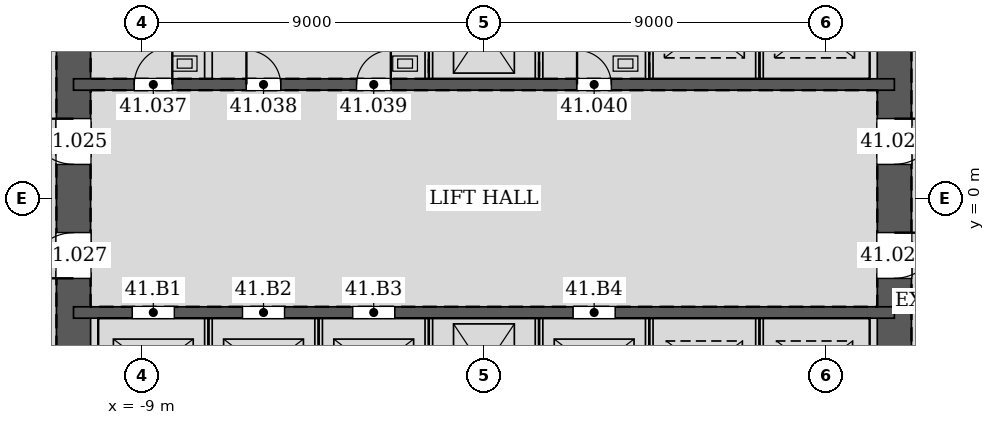
"""IFC4 building model, lengths in metres.
Left out: names, types, materials, properties, quantities, classifications, styles, units other than length and angle.
Written with IfcOpenShell. Run it as: python <this file> out.ifc"""

import sys

from ifc_helpers import new_model, si_unit, direction, frame, frame_2d, origin, place, context, subcontext, project, spatial, rectangle, extrude, element, fill, save


model = new_model("IFC4")
c1 = context("Model", 3, precision=1e-05, world=origin(), true_north=direction((0.0, 1.0)))
c2 = subcontext(c1, "Body", "Model", "MODEL_VIEW")
j1 = project(units=[si_unit("LENGTHUNIT", "METRE"), si_unit("PLANEANGLEUNIT", "RADIAN")], contexts=[c1])
p1 = place(None, origin())
s1 = spatial("IfcSite", under=j1, at=p1, CompositionType="ELEMENT")
p2 = place(p1, origin())
s2 = spatial("IfcBuilding", under=s1, at=p2, CompositionType="ELEMENT")
p3 = place(p2, frame((0.0, 0.0, 180.6)))
s3 = spatial("IfcBuildingStorey", under=s2, at=p3, CompositionType="ELEMENT", Elevation=180.6)
p4 = place(p3, frame((10.8, -10.8, 0.0), z_axis=(0.0, 0.0, 1.0), x_axis=(0.0, 1.0, 0.0)))
e1 = element("IfcWall", 1, at=p4, inside=s3, PredefinedType="SOLIDWALL", context=c2, shape_type="SweptSolid", body=[
    extrude(rectangle(XDim=21.6, YDim=0.9, at=frame_2d((10.8, 0.0))), origin(), (0.0, 0.0, 1.0), 4.2),
])
p5 = place(p4, frame((11.7, 0.0, 0.0)))
e2 = element("IfcOpeningElement", 2, at=p5, cuts=e1, PredefinedType="OPENING", context=c2, shape_type="SweptSolid", body=[
    extrude(rectangle(XDim=1.2, YDim=2.1, at=frame_2d((0.6, 1.05))), frame((0.0, 0.46, 0.0), z_axis=(0.0, -1.0, 0.0), x_axis=(1.0, 0.0, 0.0)), (0.0, 0.0, 1.0), 0.92),
])
p6 = place(p4, frame((8.7, 0.0, 0.0)))
e3 = element("IfcOpeningElement", 3, at=p6, cuts=e1, PredefinedType="OPENING", context=c2, shape_type="SweptSolid", body=[
    extrude(rectangle(XDim=1.2, YDim=2.1, at=frame_2d((0.6, 1.05))), frame((0.0, 0.46, 0.0), z_axis=(0.0, -1.0, 0.0), x_axis=(1.0, 0.0, 0.0)), (0.0, 0.0, 1.0), 0.92),
])
p7 = place(p3, frame((-10.8, 10.8, 0.0), z_axis=(0.0, 0.0, 1.0), x_axis=(0.0, -1.0, 0.0)))
e4 = element("IfcWall", 4, at=p7, inside=s3, PredefinedType="SOLIDWALL", context=c2, shape_type="SweptSolid", body=[
    extrude(rectangle(XDim=21.6, YDim=0.9, at=frame_2d((10.8, 0.0))), origin(), (0.0, 0.0, 1.0), 4.2),
])
p8 = place(p7, frame((8.7, 0.0, 0.0)))
e5 = element("IfcOpeningElement", 5, at=p8, cuts=e4, PredefinedType="OPENING", context=c2, shape_type="SweptSolid", body=[
    extrude(rectangle(XDim=1.2, YDim=2.1, at=frame_2d((0.6, 1.05))), frame((0.0, 0.46, 0.0), z_axis=(0.0, -1.0, 0.0), x_axis=(1.0, 0.0, 0.0)), (0.0, 0.0, 1.0), 0.92),
])
p9 = place(p7, frame((11.7, 0.0, 0.0)))
e6 = element("IfcOpeningElement", 6, at=p9, cuts=e4, PredefinedType="OPENING", context=c2, shape_type="SweptSolid", body=[
    extrude(rectangle(XDim=1.2, YDim=2.1, at=frame_2d((0.6, 1.05))), frame((0.0, 0.46, 0.0), z_axis=(0.0, -1.0, 0.0), x_axis=(1.0, 0.0, 0.0)), (0.0, 0.0, 1.0), 0.92),
])
p10 = place(p3, frame((-10.8, 3.0, 0.0), z_axis=(0.0, 0.0, 1.0), x_axis=(1.0, 0.0, 0.0)))
e7 = element("IfcWall", 7, at=p10, inside=s3, PredefinedType="SOLIDWALL", context=c2, shape_type="SweptSolid", body=[
    extrude(rectangle(XDim=21.6, YDim=0.3, at=frame_2d((10.8, 0.0))), origin(), (0.0, 0.0, 1.0), 4.2),
])
p11 = place(p10, frame((1.6, 0.0, 0.0)))
e8 = element("IfcOpeningElement", 8, at=p11, cuts=e7, PredefinedType="OPENING", context=c2, shape_type="SweptSolid", body=[
    extrude(rectangle(XDim=1.0, YDim=2.1, at=frame_2d((0.5, 1.05))), frame((0.0, 0.16, 0.0), z_axis=(0.0, -1.0, 0.0), x_axis=(1.0, 0.0, 0.0)), (0.0, 0.0, 1.0), 0.32),
])
p12 = place(p10, frame((4.55, 0.0, 0.0)))
e9 = element("IfcOpeningElement", 9, at=p12, cuts=e7, PredefinedType="OPENING", context=c2, shape_type="SweptSolid", body=[
    extrude(rectangle(XDim=0.9, YDim=2.1, at=frame_2d((0.45, 1.05))), frame((0.0, 0.16, 0.0), z_axis=(0.0, -1.0, 0.0), x_axis=(1.0, 0.0, 0.0)), (0.0, 0.0, 1.0), 0.32),
])
p13 = place(p10, frame((7.45, 0.0, 0.0)))
e10 = element("IfcOpeningElement", 10, at=p13, cuts=e7, PredefinedType="OPENING", context=c2, shape_type="SweptSolid", body=[
    extrude(rectangle(XDim=0.9, YDim=2.1, at=frame_2d((0.45, 1.05))), frame((0.0, 0.16, 0.0), z_axis=(0.0, -1.0, 0.0), x_axis=(1.0, 0.0, 0.0)), (0.0, 0.0, 1.0), 0.32),
])
p14 = place(p10, frame((13.25, 0.0, 0.0)))
e11 = element("IfcOpeningElement", 11, at=p14, cuts=e7, PredefinedType="OPENING", context=c2, shape_type="SweptSolid", body=[
    extrude(rectangle(XDim=0.9, YDim=2.1, at=frame_2d((0.45, 1.05))), frame((0.0, 0.16, 0.0), z_axis=(0.0, -1.0, 0.0), x_axis=(1.0, 0.0, 0.0)), (0.0, 0.0, 1.0), 0.32),
])
p15 = place(p3, frame((-10.8, -3.0, 0.0), z_axis=(0.0, 0.0, 1.0), x_axis=(1.0, 0.0, 0.0)))
e12 = element("IfcWall", 12, at=p15, inside=s3, PredefinedType="SOLIDWALL", context=c2, shape_type="SweptSolid", body=[
    extrude(rectangle(XDim=21.6, YDim=0.3, at=frame_2d((10.8, 0.0))), origin(), (0.0, 0.0, 1.0), 4.2),
])
p16 = place(p15, frame((1.55, 0.0, 0.0)))
e13 = element("IfcOpeningElement", 13, at=p16, cuts=e12, PredefinedType="OPENING", context=c2, shape_type="SweptSolid", body=[
    extrude(rectangle(XDim=1.1, YDim=2.1, at=frame_2d((0.55, 1.05))), frame((0.0, 0.16, 0.0), z_axis=(0.0, -1.0, 0.0), x_axis=(1.0, 0.0, 0.0)), (0.0, 0.0, 1.0), 0.32),
])
p17 = place(p15, frame((4.45, 0.0, 0.0)))
e14 = element("IfcOpeningElement", 14, at=p17, cuts=e12, PredefinedType="OPENING", context=c2, shape_type="SweptSolid", body=[
    extrude(rectangle(XDim=1.1, YDim=2.1, at=frame_2d((0.55, 1.05))), frame((0.0, 0.16, 0.0), z_axis=(0.0, -1.0, 0.0), x_axis=(1.0, 0.0, 0.0)), (0.0, 0.0, 1.0), 0.32),
])
p18 = place(p15, frame((7.35, 0.0, 0.0)))
e15 = element("IfcOpeningElement", 15, at=p18, cuts=e12, PredefinedType="OPENING", context=c2, shape_type="SweptSolid", body=[
    extrude(rectangle(XDim=1.1, YDim=2.1, at=frame_2d((0.55, 1.05))), frame((0.0, 0.16, 0.0), z_axis=(0.0, -1.0, 0.0), x_axis=(1.0, 0.0, 0.0)), (0.0, 0.0, 1.0), 0.32),
])
p19 = place(p15, frame((13.15, 0.0, 0.0)))
e16 = element("IfcOpeningElement", 16, at=p19, cuts=e12, PredefinedType="OPENING", context=c2, shape_type="SweptSolid", body=[
    extrude(rectangle(XDim=1.1, YDim=2.1, at=frame_2d((0.55, 1.05))), frame((0.0, 0.16, 0.0), z_axis=(0.0, -1.0, 0.0), x_axis=(1.0, 0.0, 0.0)), (0.0, 0.0, 1.0), 0.32),
])
for number, where, z_axis, x_axis in (
    (17, (-7.25, 3.15, 0.0), (0.0, 0.0, 1.0), (0.0, 1.0, 0.0)),
    (18, (-1.45, 3.15, 0.0), (0.0, 0.0, 1.0), (0.0, 1.0, 0.0)),
    (19, (1.45, 3.15, 0.0), (0.0, 0.0, 1.0), (0.0, 1.0, 0.0)),
    (20, (4.35, 3.15, 0.0), (0.0, 0.0, 1.0), (0.0, 1.0, 0.0)),
):
    element("IfcWall", number, at=place(p3, frame(where, z_axis=z_axis, x_axis=x_axis)), inside=s3, PredefinedType="PARTITIONING", context=c2, shape_type="SweptSolid", body=[
        extrude(rectangle(XDim=2.7, YDim=0.2, at=frame_2d((1.35, 0.0))), origin(), (0.0, 0.0, 1.0), 4.035),
    ])
for number, where, z_axis, x_axis in (
    (21, (7.25, 3.15, 0.0), (0.0, 0.0, 1.0), (0.0, 1.0, 0.0)),
    (22, (-7.25, -5.85, 0.0), (0.0, 0.0, 1.0), (0.0, 1.0, 0.0)),
    (23, (-4.35, -5.85, 0.0), (0.0, 0.0, 1.0), (0.0, 1.0, 0.0)),
    (24, (-1.45, -5.85, 0.0), (0.0, 0.0, 1.0), (0.0, 1.0, 0.0)),
    (25, (1.45, -5.85, 0.0), (0.0, 0.0, 1.0), (0.0, 1.0, 0.0)),
    (26, (4.35, -5.85, 0.0), (0.0, 0.0, 1.0), (0.0, 1.0, 0.0)),
    (27, (7.25, -5.85, 0.0), (0.0, 0.0, 1.0), (0.0, 1.0, 0.0)),
):
    element("IfcWall", number, at=place(p3, frame(where, z_axis=z_axis, x_axis=x_axis)), inside=s3, PredefinedType="PARTITIONING", context=c2, shape_type="SweptSolid", body=[
        extrude(rectangle(XDim=2.7, YDim=0.2, at=frame_2d((1.35, 0.0))), origin(), (0.0, 0.0, 1.0), 4.2),
    ])
p20 = place(p5, frame((1.2, 0.0, 0.0), z_axis=(0.0, 0.0, 1.0), x_axis=(-1.0, 0.0, 0.0)))
e28 = element("IfcDoor", 28, at=p20, inside=s3, OperationType="SINGLE_SWING_LEFT", PredefinedType="DOOR", context=c2, shape_type="SweptSolid", body=[
    extrude(rectangle(XDim=1.2, YDim=2.1, at=frame_2d((0.6, 1.05))), frame((0.0, 0.025, 0.0), z_axis=(0.0, -1.0, 0.0), x_axis=(1.0, 0.0, 0.0)), (0.0, 0.0, 1.0), 0.05),
])
fill(e2, e28)
p21 = place(p8, frame((1.2, 0.0, 0.0), z_axis=(0.0, 0.0, 1.0), x_axis=(-1.0, 0.0, 0.0)))
e29 = element("IfcDoor", 29, at=p21, inside=s3, OperationType="SINGLE_SWING_RIGHT", PredefinedType="DOOR", context=c2, shape_type="SweptSolid", body=[
    extrude(rectangle(XDim=1.2, YDim=2.1, at=frame_2d((0.6, 1.05))), frame((0.0, 0.025, 0.0), z_axis=(0.0, -1.0, 0.0), x_axis=(1.0, 0.0, 0.0)), (0.0, 0.0, 1.0), 0.05),
])
fill(e5, e29)
p22 = place(p6, frame((1.2, 0.0, 0.0), z_axis=(0.0, 0.0, 1.0), x_axis=(-1.0, 0.0, 0.0)))
e30 = element("IfcDoor", 30, at=p22, inside=s3, OperationType="SINGLE_SWING_LEFT", PredefinedType="DOOR", context=c2, shape_type="SweptSolid", body=[
    extrude(rectangle(XDim=1.2, YDim=2.1, at=frame_2d((0.6, 1.05))), frame((0.0, 0.025, 0.0), z_axis=(0.0, -1.0, 0.0), x_axis=(1.0, 0.0, 0.0)), (0.0, 0.0, 1.0), 0.05),
])
fill(e3, e30)
p23 = place(p9, frame((1.2, 0.0, 0.0), z_axis=(0.0, 0.0, 1.0), x_axis=(-1.0, 0.0, 0.0)))
e31 = element("IfcDoor", 31, at=p23, inside=s3, OperationType="SINGLE_SWING_LEFT", PredefinedType="DOOR", context=c2, shape_type="SweptSolid", body=[
    extrude(rectangle(XDim=1.2, YDim=2.1, at=frame_2d((0.6, 1.05))), frame((0.0, 0.025, 0.0), z_axis=(0.0, -1.0, 0.0), x_axis=(1.0, 0.0, 0.0)), (0.0, 0.0, 1.0), 0.05),
])
fill(e6, e31)
p24 = place(p11, origin())
e32 = element("IfcDoor", 32, at=p24, inside=s3, OperationType="SINGLE_SWING_RIGHT", PredefinedType="DOOR", context=c2, shape_type="SweptSolid", body=[
    extrude(rectangle(XDim=1.0, YDim=2.1, at=frame_2d((0.5, 1.05))), frame((0.0, 0.025, 0.0), z_axis=(0.0, -1.0, 0.0), x_axis=(1.0, 0.0, 0.0)), (0.0, 0.0, 1.0), 0.05),
])
fill(e8, e32)
p25 = place(p12, origin())
e33 = element("IfcDoor", 33, at=p25, inside=s3, OperationType="SINGLE_SWING_LEFT", PredefinedType="DOOR", context=c2, shape_type="SweptSolid", body=[
    extrude(rectangle(XDim=0.9, YDim=2.1, at=frame_2d((0.45, 1.05))), frame((0.0, 0.025, 0.0), z_axis=(0.0, -1.0, 0.0), x_axis=(1.0, 0.0, 0.0)), (0.0, 0.0, 1.0), 0.05),
])
fill(e9, e33)
p26 = place(p13, origin())
e34 = element("IfcDoor", 34, at=p26, inside=s3, OperationType="SINGLE_SWING_RIGHT", PredefinedType="DOOR", context=c2, shape_type="SweptSolid", body=[
    extrude(rectangle(XDim=0.9, YDim=2.1, at=frame_2d((0.45, 1.05))), frame((0.0, 0.025, 0.0), z_axis=(0.0, -1.0, 0.0), x_axis=(1.0, 0.0, 0.0)), (0.0, 0.0, 1.0), 0.05),
])
fill(e10, e34)
p27 = place(p14, origin())
e35 = element("IfcDoor", 35, at=p27, inside=s3, OperationType="SINGLE_SWING_LEFT", PredefinedType="DOOR", context=c2, shape_type="SweptSolid", body=[
    extrude(rectangle(XDim=0.9, YDim=2.1, at=frame_2d((0.45, 1.05))), frame((0.0, 0.025, 0.0), z_axis=(0.0, -1.0, 0.0), x_axis=(1.0, 0.0, 0.0)), (0.0, 0.0, 1.0), 0.05),
])
fill(e11, e35)
p28 = place(p16, origin())
e36 = element("IfcDoor", 36, at=p28, inside=s3, OperationType="DOUBLE_DOOR_SLIDING", PredefinedType="DOOR", context=c2, shape_type="SweptSolid", body=[
    extrude(rectangle(XDim=1.1, YDim=2.1, at=frame_2d((0.55, 1.05))), frame((0.0, 0.025, 0.0), z_axis=(0.0, -1.0, 0.0), x_axis=(1.0, 0.0, 0.0)), (0.0, 0.0, 1.0), 0.05),
])
fill(e13, e36)
p29 = place(p17, origin())
e37 = element("IfcDoor", 37, at=p29, inside=s3, OperationType="DOUBLE_DOOR_SLIDING", PredefinedType="DOOR", context=c2, shape_type="SweptSolid", body=[
    extrude(rectangle(XDim=1.1, YDim=2.1, at=frame_2d((0.55, 1.05))), frame((0.0, 0.025, 0.0), z_axis=(0.0, -1.0, 0.0), x_axis=(1.0, 0.0, 0.0)), (0.0, 0.0, 1.0), 0.05),
])
fill(e14, e37)
p30 = place(p18, origin())
e38 = element("IfcDoor", 38, at=p30, inside=s3, OperationType="DOUBLE_DOOR_SLIDING", PredefinedType="DOOR", context=c2, shape_type="SweptSolid", body=[
    extrude(rectangle(XDim=1.1, YDim=2.1, at=frame_2d((0.55, 1.05))), frame((0.0, 0.025, 0.0), z_axis=(0.0, -1.0, 0.0), x_axis=(1.0, 0.0, 0.0)), (0.0, 0.0, 1.0), 0.05),
])
fill(e15, e38)
p31 = place(p19, origin())
e39 = element("IfcDoor", 39, at=p31, inside=s3, OperationType="DOUBLE_DOOR_SLIDING", PredefinedType="DOOR", context=c2, shape_type="SweptSolid", body=[
    extrude(rectangle(XDim=1.1, YDim=2.1, at=frame_2d((0.55, 1.05))), frame((0.0, 0.025, 0.0), z_axis=(0.0, -1.0, 0.0), x_axis=(1.0, 0.0, 0.0)), (0.0, 0.0, 1.0), 0.05),
])
fill(e16, e39)
save(model, sys.argv[1])
